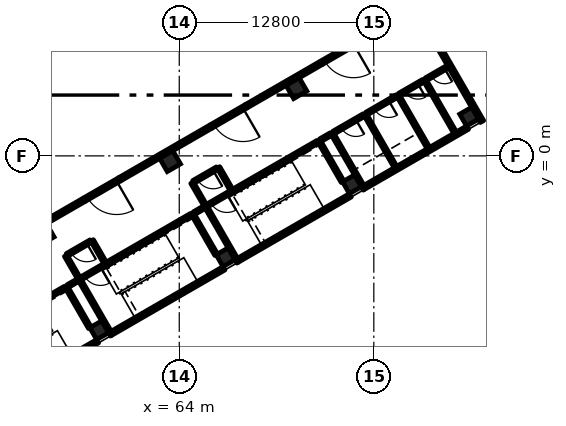
"""IFC4 building model, lengths in metres.
Left out: names, types, materials, properties, quantities, classifications, styles, units other than length and angle.
Written with IfcOpenShell. Run it as: python <this file> out.ifc"""

import sys

from ifc_helpers import new_model, si_unit, direction, frame, frame_2d, origin, origin_2d, place, context, subcontext, project, spatial, rectangle, extrude, element, fill, save


model = new_model("IFC4")
c1 = context("Model", 3, precision=1e-05, world=origin(), true_north=direction((0.0, 1.0)))
c2 = subcontext(c1, "Body", "Model", "MODEL_VIEW")
j1 = project(units=[si_unit("LENGTHUNIT", "METRE"), si_unit("PLANEANGLEUNIT", "RADIAN")], contexts=[c1])
p1 = place(None, origin())
s1 = spatial("IfcSite", under=j1, at=p1, CompositionType="ELEMENT")
p2 = place(p1, origin())
s2 = spatial("IfcBuilding", under=s1, at=p2, CompositionType="ELEMENT")
p3 = place(p2, frame((0.0, 0.0, 6.0)))
s3 = spatial("IfcBuildingStorey", under=s2, at=p3, CompositionType="ELEMENT", Elevation=6.0)
for number, where, z_axis, x_axis in (
    (1, (58.732, -11.471, 0.0), (0.0, 0.0, 1.0), (-0.5, 0.866, 0.0)),
    (2, (67.046, -6.671, 0.0), (0.0, 0.0, 1.0), (-0.5, 0.866, 0.0)),
    (3, (75.36, -1.871, 0.0), (0.0, 0.0, 1.0), (-0.5, 0.866, 0.0)),
    (4, (83.067, 2.579, 0.0), (0.0, 0.0, 1.0), (-0.5, 0.866, 0.0)),
):
    element("IfcColumn", number, at=place(p3, frame(where, z_axis=z_axis, x_axis=x_axis)), inside=s3, PredefinedType="COLUMN", context=c2, shape_type="SweptSolid", body=[
        extrude(rectangle(XDim=0.9, YDim=0.9, at=origin_2d()), origin(), (0.0, 0.0, 1.0), 5.4),
    ])
for number, where, z_axis, x_axis in (
    (5, (55.082, -5.149, 0.0), (0.0, 0.0, 1.0), (-0.5, 0.866, 0.0)),
    (6, (63.396, -0.349, 0.0), (0.0, 0.0, 1.0), (-0.5, 0.866, 0.0)),
    (7, (71.71, 4.451, 0.0), (0.0, 0.0, 1.0), (-0.5, 0.866, 0.0)),
):
    element("IfcColumn", number, at=place(p3, frame(where, z_axis=z_axis, x_axis=x_axis)), inside=s3, PredefinedType="COLUMN", context=c2, shape_type="SweptSolid", body=[
        extrude(rectangle(XDim=1.0, YDim=1.0, at=origin_2d()), origin(), (0.0, 0.0, 1.0), 5.4),
    ])
p4 = place(p3, frame((78.759, 11.191, 0.0), z_axis=(0.0, 0.0, 1.0), x_axis=(0.500001855621, -0.866024332438, 0.0)))
e8 = element("IfcWall", 8, at=p4, inside=s3, PredefinedType="SOLIDWALL", context=c2, shape_type="SweptSolid", body=[
    extrude(rectangle(XDim=10.312, YDim=0.25, at=frame_2d((5.156, 0.0))), origin(), (0.0, 0.0, 1.0), 5.1),
])
p5 = place(p3, frame((58.63, -12.194, 0.0), z_axis=(0.0, 0.0, 1.0), x_axis=(-0.866027159341, -0.499996959274, 0.0)))
e9 = element("IfcWall", 9, at=p5, inside=s3, PredefinedType="SOLIDWALL", context=c2, shape_type="SweptSolid", body=[
    extrude(rectangle(XDim=11.625, YDim=0.25, at=frame_2d((5.812, 0.0))), origin(), (0.0, 0.0, 1.0), 5.1),
])
p6 = place(p3, frame((66.944, -7.394, 0.0), z_axis=(0.0, 0.0, 1.0), x_axis=(-0.866033360935, -0.499986217557, 0.0)))
e10 = element("IfcWall", 10, at=p6, inside=s3, PredefinedType="SOLIDWALL", context=c2, shape_type="SweptSolid", body=[
    extrude(rectangle(XDim=8.6, YDim=0.25, at=frame_2d((4.3, 0.0))), origin(), (0.0, 0.0, 1.0), 5.1),
])
p7 = place(p3, frame((75.258, -2.594, 0.0), z_axis=(0.0, 0.0, 1.0), x_axis=(-0.866028165386, -0.499995216735, 0.0)))
e11 = element("IfcWall", 11, at=p7, inside=s3, PredefinedType="SOLIDWALL", context=c2, shape_type="SweptSolid", body=[
    extrude(rectangle(XDim=8.6, YDim=0.25, at=frame_2d((4.3, 0.0))), origin(), (0.0, 0.0, 1.0), 5.1),
])
p8 = place(p3, frame((82.965, 1.856, 0.0), z_axis=(0.0, 0.0, 1.0), x_axis=(-0.866026562566, -0.499997992926, 0.0)))
e12 = element("IfcWall", 12, at=p8, inside=s3, PredefinedType="SOLIDWALL", context=c2, shape_type="SweptSolid", body=[
    extrude(rectangle(XDim=7.9, YDim=0.25, at=frame_2d((3.95, 0.0))), origin(), (0.0, 0.0, 1.0), 5.1),
])
p9 = place(p3, frame((59.496, -11.694, 0.0), z_axis=(0.0, 0.0, 1.0), x_axis=(-0.865982457891, -0.500074377092, 0.0)))
e13 = element("IfcWall", 13, at=p9, inside=s3, PredefinedType="SOLIDWALL", context=c2, shape_type="SweptSolid", body=[
    extrude(rectangle(XDim=0.1, YDim=0.25, at=frame_2d((0.05, 0.0))), origin(), (0.0, 0.0, 1.0), 5.1),
])
p10 = place(p3, frame((67.81, -6.894, 0.0), z_axis=(0.0, 0.0, 1.0), x_axis=(-0.867038199201, -0.4982416694, 0.0)))
e14 = element("IfcWall", 14, at=p10, inside=s3, PredefinedType="SOLIDWALL", context=c2, shape_type="SweptSolid", body=[
    extrude(rectangle(XDim=0.1, YDim=0.25, at=frame_2d((0.05, 0.0))), origin(), (0.0, 0.0, 1.0), 5.1),
])
p11 = place(p3, frame((76.124, -2.094, 0.0), z_axis=(0.0, 0.0, 1.0), x_axis=(-0.865982457891, -0.500074377092, 0.0)))
e15 = element("IfcWall", 15, at=p11, inside=s3, PredefinedType="SOLIDWALL", context=c2, shape_type="SweptSolid", body=[
    extrude(rectangle(XDim=0.1, YDim=0.25, at=frame_2d((0.05, 0.0))), origin(), (0.0, 0.0, 1.0), 5.1),
])
p12 = place(p3, frame((58.117, -11.306, 0.0), z_axis=(0.0, 0.0, 1.0), x_axis=(-0.499933790963, 0.866063626216, 0.0)))
e16 = element("IfcWall", 16, at=p12, inside=s3, PredefinedType="SOLIDWALL", context=c2, shape_type="SweptSolid", body=[
    extrude(rectangle(XDim=3.1, YDim=0.2, at=frame_2d((1.55, 0.0))), origin(), (0.0, 0.0, 1.0), 5.1),
])
p13 = place(p3, frame((59.433, -11.585, 0.0), z_axis=(0.0, 0.0, 1.0), x_axis=(-0.49999894854, 0.866026010844, 0.0)))
e17 = element("IfcWall", 17, at=p13, inside=s3, PredefinedType="SOLIDWALL", context=c2, shape_type="SweptSolid", body=[
    extrude(rectangle(XDim=4.0, YDim=0.2, at=frame_2d((2.0, 0.0))), origin(), (0.0, 0.0, 1.0), 5.1),
])
p14 = place(p3, frame((66.431, -6.506, 0.0), z_axis=(0.0, 0.0, 1.0), x_axis=(-0.49999285859, 0.86602952684, 0.0)))
e18 = element("IfcWall", 18, at=p14, inside=s3, PredefinedType="SOLIDWALL", context=c2, shape_type="SweptSolid", body=[
    extrude(rectangle(XDim=3.1, YDim=0.2, at=frame_2d((1.55, 0.0))), origin(), (0.0, 0.0, 1.0), 5.1),
])
p15 = place(p3, frame((67.747, -6.785, 0.0), z_axis=(0.0, 0.0, 1.0), x_axis=(-0.49999894854, 0.866026010844, 0.0)))
e19 = element("IfcWall", 19, at=p15, inside=s3, PredefinedType="SOLIDWALL", context=c2, shape_type="SweptSolid", body=[
    extrude(rectangle(XDim=4.0, YDim=0.2, at=frame_2d((2.0, 0.0))), origin(), (0.0, 0.0, 1.0), 5.1),
])
p16 = place(p3, frame((74.745, -1.706, 0.0), z_axis=(0.0, 0.0, 1.0), x_axis=(-0.500026960575, 0.86600983753, 0.0)))
e20 = element("IfcWall", 20, at=p16, inside=s3, PredefinedType="SOLIDWALL", context=c2, shape_type="SweptSolid", body=[
    extrude(rectangle(XDim=3.1, YDim=0.2, at=frame_2d((1.55, 0.0))), origin(), (0.0, 0.0, 1.0), 5.1),
])
p17 = place(p3, frame((50.722, -11.996, 0.0), z_axis=(0.0, 0.0, 1.0), x_axis=(0.866027239912, 0.49999681972, 0.0)))
e21 = element("IfcWall", 21, at=p17, inside=s3, PredefinedType="SOLIDWALL", context=c2, shape_type="SweptSolid", body=[
    extrude(rectangle(XDim=6.65, YDim=0.2, at=frame_2d((3.325, 0.0))), origin(), (0.0, 0.0, 1.0), 5.1),
])
p18 = place(p3, frame((59.035, -7.196, 0.0), z_axis=(0.0, 0.0, 1.0), x_axis=(-0.866002029911, -0.500040482552, 0.0)))
e22 = element("IfcWall", 22, at=p18, inside=s3, PredefinedType="SOLIDWALL", context=c2, shape_type="SweptSolid", body=[
    extrude(rectangle(XDim=1.75, YDim=0.2, at=frame_2d((0.875, 0.0))), origin(), (0.0, 0.0, 1.0), 5.1),
])
p19 = place(p18, frame((0.25, 0.0, 0.0)))
e23 = element("IfcOpeningElement", 23, at=p19, cuts=e22, PredefinedType="OPENING", context=c2, shape_type="SweptSolid", body=[
    extrude(rectangle(XDim=1.2, YDim=2.1, at=frame_2d((0.6, 1.05))), frame((0.0, 0.11, 0.0), z_axis=(0.0, -1.0, 0.0), x_axis=(1.0, 0.0, 0.0)), (0.0, 0.0, 1.0), 0.22),
])
p20 = place(p3, frame((59.035, -7.196, 0.0), z_axis=(0.0, 0.0, 1.0), x_axis=(0.866027239912, 0.49999681972, 0.0)))
e24 = element("IfcWall", 24, at=p20, inside=s3, PredefinedType="SOLIDWALL", context=c2, shape_type="SweptSolid", body=[
    extrude(rectangle(XDim=6.65, YDim=0.2, at=frame_2d((3.325, 0.0))), origin(), (0.0, 0.0, 1.0), 5.1),
])
p21 = place(p3, frame((67.349, -2.396, 0.0), z_axis=(0.0, 0.0, 1.0), x_axis=(-0.866036909293, -0.499980071345, 0.0)))
e25 = element("IfcWall", 25, at=p21, inside=s3, PredefinedType="SOLIDWALL", context=c2, shape_type="SweptSolid", body=[
    extrude(rectangle(XDim=1.75, YDim=0.2, at=frame_2d((0.875, 0.0))), origin(), (0.0, 0.0, 1.0), 5.1),
])
p22 = place(p21, frame((0.25, 0.0, 0.0)))
e26 = element("IfcOpeningElement", 26, at=p22, cuts=e25, PredefinedType="OPENING", context=c2, shape_type="SweptSolid", body=[
    extrude(rectangle(XDim=1.2, YDim=2.1, at=frame_2d((0.6, 1.05))), frame((0.0, 0.11, 0.0), z_axis=(0.0, -1.0, 0.0), x_axis=(1.0, 0.0, 0.0)), (0.0, 0.0, 1.0), 0.22),
])
p23 = place(p3, frame((67.349, -2.396, 0.0), z_axis=(0.0, 0.0, 1.0), x_axis=(0.86601134256, 0.500024353964, 0.0)))
e27 = element("IfcWall", 27, at=p23, inside=s3, PredefinedType="SOLIDWALL", context=c2, shape_type="SweptSolid", body=[
    extrude(rectangle(XDim=6.65, YDim=0.2, at=frame_2d((3.325, 0.0))), origin(), (0.0, 0.0, 1.0), 5.1),
])
for number, where, z_axis, x_axis in (
    (28, (76.061, -1.986, 0.0), (0.0, 0.0, 1.0), (-0.5, 0.866, 0.0)),
    (29, (78.226, -0.736, 0.0), (0.0, 0.0, 1.0), (-0.5, 0.866, 0.0)),
    (30, (80.391, 0.514, 0.0), (0.0, 0.0, 1.0), (-0.5, 0.866, 0.0)),
):
    element("IfcWall", number, at=place(p3, frame(where, z_axis=z_axis, x_axis=x_axis)), inside=s3, PredefinedType="SOLIDWALL", context=c2, shape_type="SweptSolid", body=[
        extrude(rectangle(XDim=4.0, YDim=0.2, at=frame_2d((2.0, 0.0))), origin(), (0.0, 0.0, 1.0), 5.1),
    ])
p24 = place(p3, frame((76.139, 2.679, 0.0), z_axis=(0.0, 0.0, 1.0), x_axis=(-0.865980515519, -0.500077740698, 0.0)))
e31 = element("IfcWall", 31, at=p24, inside=s3, PredefinedType="SOLIDWALL", context=c2, shape_type="SweptSolid", body=[
    extrude(rectangle(XDim=2.3, YDim=0.2, at=frame_2d((1.15, 0.0))), origin(), (0.0, 0.0, 1.0), 5.1),
])
p25 = place(p24, frame((0.6, 0.0, 0.0)))
e32 = element("IfcOpeningElement", 32, at=p25, cuts=e31, PredefinedType="OPENING", context=c2, shape_type="SweptSolid", body=[
    extrude(rectangle(XDim=1.1, YDim=2.1, at=frame_2d((0.55, 1.05))), frame((0.0, 0.11, 0.0), z_axis=(0.0, -1.0, 0.0), x_axis=(1.0, 0.0, 0.0)), (0.0, 0.0, 1.0), 0.22),
])
p26 = place(p3, frame((78.304, 3.929, 0.0), z_axis=(0.0, 0.0, 1.0), x_axis=(-0.865980515519, -0.500077740698, 0.0)))
e33 = element("IfcWall", 33, at=p26, inside=s3, PredefinedType="SOLIDWALL", context=c2, shape_type="SweptSolid", body=[
    extrude(rectangle(XDim=2.3, YDim=0.2, at=frame_2d((1.15, 0.0))), origin(), (0.0, 0.0, 1.0), 5.1),
])
p27 = place(p26, frame((0.6, 0.0, 0.0)))
e34 = element("IfcOpeningElement", 34, at=p27, cuts=e33, PredefinedType="OPENING", context=c2, shape_type="SweptSolid", body=[
    extrude(rectangle(XDim=1.1, YDim=2.1, at=frame_2d((0.55, 1.05))), frame((0.0, 0.11, 0.0), z_axis=(0.0, -1.0, 0.0), x_axis=(1.0, 0.0, 0.0)), (0.0, 0.0, 1.0), 0.22),
])
for number, where, z_axis, x_axis in (
    (35, (57.383, -8.035, 0.0), (0.0, 0.0, 1.0), (-0.5, 0.866, 0.0)),
    (36, (59.115, -7.035, 0.0), (0.0, 0.0, 1.0), (-0.5, 0.866, 0.0)),
):
    element("IfcWall", number, at=place(p3, frame(where, z_axis=z_axis, x_axis=x_axis)), inside=s3, PredefinedType="PARTITIONING", context=c2, shape_type="SweptSolid", body=[
        extrude(rectangle(XDim=1.7, YDim=0.2, at=frame_2d((0.85, 0.0))), origin(), (0.0, 0.0, 1.0), 4.5),
    ])
p28 = place(p3, frame((65.697, -3.235, 0.0), z_axis=(0.0, 0.0, 1.0), x_axis=(-0.499892348375, 0.866087547558, 0.0)))
e37 = element("IfcWall", 37, at=p28, inside=s3, PredefinedType="PARTITIONING", context=c2, shape_type="SweptSolid", body=[
    extrude(rectangle(XDim=1.7, YDim=0.2, at=frame_2d((0.85, 0.0))), origin(), (0.0, 0.0, 1.0), 4.5),
])
p29 = place(p3, frame((67.429, -2.235, 0.0), z_axis=(0.0, 0.0, 1.0), x_axis=(-0.500000056704, 0.866025371046, 0.0)))
e38 = element("IfcWall", 38, at=p29, inside=s3, PredefinedType="PARTITIONING", context=c2, shape_type="SweptSolid", body=[
    extrude(rectangle(XDim=1.7, YDim=0.2, at=frame_2d((0.85, 0.0))), origin(), (0.0, 0.0, 1.0), 4.5),
])
p30 = place(p3, frame((58.179, -5.613, 0.0), z_axis=(0.0, 0.0, 1.0), x_axis=(-0.866047807691, -0.499961193289, 0.0)))
e39 = element("IfcWall", 39, at=p30, inside=s3, PredefinedType="PARTITIONING", context=c2, shape_type="SweptSolid", body=[
    extrude(rectangle(XDim=1.8, YDim=0.2, at=frame_2d((0.9, 0.0))), origin(), (0.0, 0.0, 1.0), 4.5),
])
p31 = place(p30, frame((0.3, 0.0, 0.0)))
e40 = element("IfcOpeningElement", 40, at=p31, cuts=e39, PredefinedType="OPENING", context=c2, shape_type="SweptSolid", body=[
    extrude(rectangle(XDim=1.2, YDim=2.1, at=frame_2d((0.6, 1.05))), frame((0.0, 0.11, 0.0), z_axis=(0.0, -1.0, 0.0), x_axis=(1.0, 0.0, 0.0)), (0.0, 0.0, 1.0), 0.22),
])
p32 = place(p3, frame((66.493, -0.812, 0.0), z_axis=(0.0, 0.0, 1.0), x_axis=(-0.866081705922, -0.499902469156, 0.0)))
e41 = element("IfcWall", 41, at=p32, inside=s3, PredefinedType="PARTITIONING", context=c2, shape_type="SweptSolid", body=[
    extrude(rectangle(XDim=1.8, YDim=0.2, at=frame_2d((0.9, 0.0))), origin(), (0.0, 0.0, 1.0), 4.5),
])
p33 = place(p32, frame((0.3, 0.0, 0.0)))
e42 = element("IfcOpeningElement", 42, at=p33, cuts=e41, PredefinedType="OPENING", context=c2, shape_type="SweptSolid", body=[
    extrude(rectangle(XDim=1.2, YDim=2.1, at=frame_2d((0.6, 1.05))), frame((0.0, 0.11, 0.0), z_axis=(0.0, -1.0, 0.0), x_axis=(1.0, 0.0, 0.0)), (0.0, 0.0, 1.0), 0.22),
])
p34 = place(p3, frame((51.782, -6.333, 0.0), z_axis=(0.0, 0.0, 1.0), x_axis=(0.866028853923, 0.499994024137, 0.0)))
e43 = element("IfcWall", 43, at=p34, inside=s3, PredefinedType="SOLIDWALL", context=c2, shape_type="SweptSolid", body=[
    extrude(rectangle(XDim=6.9, YDim=0.25, at=frame_2d((3.45, 0.0))), origin(), (0.0, 0.0, 1.0), 4.5),
])
p35 = place(p3, frame((60.095, -1.532, 0.0), z_axis=(0.0, 0.0, 1.0), x_axis=(-0.86599734893, -0.500048589285, 0.0)))
e44 = element("IfcWall", 44, at=p35, inside=s3, PredefinedType="SOLIDWALL", context=c2, shape_type="SweptSolid", body=[
    extrude(rectangle(XDim=2.7, YDim=0.25, at=frame_2d((1.35, 0.0))), origin(), (0.0, 0.0, 1.0), 4.5),
])
p36 = place(p35, frame((0.25, 0.0, 0.0)))
e45 = element("IfcOpeningElement", 45, at=p36, cuts=e44, PredefinedType="OPENING", context=c2, shape_type="SweptSolid", body=[
    extrude(rectangle(XDim=2.2, YDim=2.1, at=frame_2d((1.1, 1.05))), frame((0.0, 0.135, 0.0), z_axis=(0.0, -1.0, 0.0), x_axis=(1.0, 0.0, 0.0)), (0.0, 0.0, 1.0), 0.27),
])
p37 = place(p3, frame((60.095, -1.532, 0.0), z_axis=(0.0, 0.0, 1.0), x_axis=(0.866028853923, 0.499994024137, 0.0)))
e46 = element("IfcWall", 46, at=p37, inside=s3, PredefinedType="SOLIDWALL", context=c2, shape_type="SweptSolid", body=[
    extrude(rectangle(XDim=6.9, YDim=0.25, at=frame_2d((3.45, 0.0))), origin(), (0.0, 0.0, 1.0), 4.5),
])
p38 = place(p3, frame((68.409, 3.268, 0.0), z_axis=(0.0, 0.0, 1.0), x_axis=(-0.866019956843, -0.50000943426, 0.0)))
e47 = element("IfcWall", 47, at=p38, inside=s3, PredefinedType="SOLIDWALL", context=c2, shape_type="SweptSolid", body=[
    extrude(rectangle(XDim=2.7, YDim=0.25, at=frame_2d((1.35, 0.0))), origin(), (0.0, 0.0, 1.0), 4.5),
])
p39 = place(p38, frame((0.25, 0.0, 0.0)))
e48 = element("IfcOpeningElement", 48, at=p39, cuts=e47, PredefinedType="OPENING", context=c2, shape_type="SweptSolid", body=[
    extrude(rectangle(XDim=2.2, YDim=2.1, at=frame_2d((1.1, 1.05))), frame((0.0, 0.135, 0.0), z_axis=(0.0, -1.0, 0.0), x_axis=(1.0, 0.0, 0.0)), (0.0, 0.0, 1.0), 0.27),
])
p40 = place(p3, frame((68.409, 3.268, 0.0), z_axis=(0.0, 0.0, 1.0), x_axis=(0.866033658841, 0.49998570155, 0.0)))
e49 = element("IfcWall", 49, at=p40, inside=s3, PredefinedType="SOLIDWALL", context=c2, shape_type="SweptSolid", body=[
    extrude(rectangle(XDim=5.7, YDim=0.25, at=frame_2d((2.85, 0.0))), origin(), (0.0, 0.0, 1.0), 4.5),
])
p41 = place(p3, frame((75.684, 7.468, 0.0), z_axis=(0.0, 0.0, 1.0), x_axis=(-0.866019956843, -0.50000943426, 0.0)))
e50 = element("IfcWall", 50, at=p41, inside=s3, PredefinedType="SOLIDWALL", context=c2, shape_type="SweptSolid", body=[
    extrude(rectangle(XDim=2.7, YDim=0.25, at=frame_2d((1.35, 0.0))), origin(), (0.0, 0.0, 1.0), 4.5),
])
p42 = place(p41, frame((0.25, 0.0, 0.0)))
e51 = element("IfcOpeningElement", 51, at=p42, cuts=e50, PredefinedType="OPENING", context=c2, shape_type="SweptSolid", body=[
    extrude(rectangle(XDim=2.2, YDim=2.1, at=frame_2d((1.1, 1.05))), frame((0.0, 0.135, 0.0), z_axis=(0.0, -1.0, 0.0), x_axis=(1.0, 0.0, 0.0)), (0.0, 0.0, 1.0), 0.27),
])
p43 = place(p3, frame((82.145, 1.527, 0.0), z_axis=(0.0, 0.0, 1.0), x_axis=(-0.49999894854, 0.866026010844, 0.0)))
e52 = element("IfcWall", 52, at=p43, inside=s3, PredefinedType="PARTITIONING", context=c2, shape_type="SweptSolid", body=[
    extrude(rectangle(XDim=4.0, YDim=0.2, at=frame_2d((2.0, 0.0))), origin(), (0.0, 0.0, 1.0), 4.5),
])
p44 = place(p3, frame((80.058, 4.941, 0.0), z_axis=(0.0, 0.0, 1.0), x_axis=(-0.865978377894, -0.500081442387, 0.0)))
e53 = element("IfcWall", 53, at=p44, inside=s3, PredefinedType="PARTITIONING", context=c2, shape_type="SweptSolid", body=[
    extrude(rectangle(XDim=1.825, YDim=0.2, at=frame_2d((0.913, 0.0))), origin(), (0.0, 0.0, 1.0), 4.5),
])
p45 = place(p44, frame((0.413, 0.0, 0.0)))
e54 = element("IfcOpeningElement", 54, at=p45, cuts=e53, PredefinedType="OPENING", context=c2, shape_type="SweptSolid", body=[
    extrude(rectangle(XDim=1.0, YDim=2.1, at=frame_2d((0.5, 1.05))), frame((0.0, 0.11, 0.0), z_axis=(0.0, -1.0, 0.0), x_axis=(1.0, 0.0, 0.0)), (0.0, 0.0, 1.0), 0.22),
])
p46 = place(p3, frame((81.682, 5.879, 0.0), z_axis=(0.0, 0.0, 1.0), x_axis=(-0.865964676353, -0.500105168249, 0.0)))
e55 = element("IfcWall", 55, at=p46, inside=s3, PredefinedType="PARTITIONING", context=c2, shape_type="SweptSolid", body=[
    extrude(rectangle(XDim=1.675, YDim=0.2, at=frame_2d((0.837, 0.0))), origin(), (0.0, 0.0, 1.0), 4.5),
])
p47 = place(p46, frame((0.262, 0.0, 0.0)))
e56 = element("IfcOpeningElement", 56, at=p47, cuts=e55, PredefinedType="OPENING", context=c2, shape_type="SweptSolid", body=[
    extrude(rectangle(XDim=1.0, YDim=2.1, at=frame_2d((0.5, 1.05))), frame((0.0, 0.11, 0.0), z_axis=(0.0, -1.0, 0.0), x_axis=(1.0, 0.0, 0.0)), (0.0, 0.0, 1.0), 0.22),
])
p48 = place(p3, frame((56.654, -8.571, 0.0), z_axis=(0.0, 0.0, 1.0), x_axis=(0.866094119867, 0.499880961361, 0.0)))
e57 = element("IfcWall", 57, at=p48, inside=s3, PredefinedType="PARTITIONING", context=c2, shape_type="SweptSolid", body=[
    extrude(rectangle(XDim=0.8, YDim=0.2, at=frame_2d((0.4, 0.0))), origin(), (0.0, 0.0, 1.0), 4.5),
])
p49 = place(p3, frame((64.968, -3.771, 0.0), z_axis=(0.0, 0.0, 1.0), x_axis=(0.865885638426, 0.500242002602, 0.0)))
e58 = element("IfcWall", 58, at=p49, inside=s3, PredefinedType="PARTITIONING", context=c2, shape_type="SweptSolid", body=[
    extrude(rectangle(XDim=0.8, YDim=0.2, at=frame_2d((0.4, 0.0))), origin(), (0.0, 0.0, 1.0), 4.5),
])
p50 = place(p3, frame((73.281, 1.029, 0.0), z_axis=(0.0, 0.0, 1.0), x_axis=(0.865961984968, 0.500109828528, 0.0)))
e59 = element("IfcWall", 59, at=p50, inside=s3, PredefinedType="PARTITIONING", context=c2, shape_type="SweptSolid", body=[
    extrude(rectangle(XDim=0.8, YDim=0.2, at=frame_2d((0.4, 0.0))), origin(), (0.0, 0.0, 1.0), 4.5),
])
p51 = place(p19, origin())
e60 = element("IfcDoor", 60, at=p51, inside=s3, OperationType="SINGLE_SWING_LEFT", PredefinedType="DOOR", context=c2, shape_type="SweptSolid", body=[
    extrude(rectangle(XDim=1.2, YDim=2.1, at=frame_2d((0.6, 1.05))), frame((0.0, 0.025, 0.0), z_axis=(0.0, -1.0, 0.0), x_axis=(1.0, 0.0, 0.0)), (0.0, 0.0, 1.0), 0.05),
])
fill(e23, e60)
p52 = place(p22, origin())
e61 = element("IfcDoor", 61, at=p52, inside=s3, OperationType="SINGLE_SWING_LEFT", PredefinedType="DOOR", context=c2, shape_type="SweptSolid", body=[
    extrude(rectangle(XDim=1.2, YDim=2.1, at=frame_2d((0.6, 1.05))), frame((0.0, 0.025, 0.0), z_axis=(0.0, -1.0, 0.0), x_axis=(1.0, 0.0, 0.0)), (0.0, 0.0, 1.0), 0.05),
])
fill(e26, e61)
p53 = place(p25, origin())
e62 = element("IfcDoor", 62, at=p53, inside=s3, OperationType="DOUBLE_DOOR_SLIDING", PredefinedType="DOOR", context=c2, shape_type="SweptSolid", body=[
    extrude(rectangle(XDim=1.1, YDim=2.1, at=frame_2d((0.55, 1.05))), frame((0.0, 0.025, 0.0), z_axis=(0.0, -1.0, 0.0), x_axis=(1.0, 0.0, 0.0)), (0.0, 0.0, 1.0), 0.05),
])
fill(e32, e62)
p54 = place(p27, origin())
e63 = element("IfcDoor", 63, at=p54, inside=s3, OperationType="DOUBLE_DOOR_SLIDING", PredefinedType="DOOR", context=c2, shape_type="SweptSolid", body=[
    extrude(rectangle(XDim=1.1, YDim=2.1, at=frame_2d((0.55, 1.05))), frame((0.0, 0.025, 0.0), z_axis=(0.0, -1.0, 0.0), x_axis=(1.0, 0.0, 0.0)), (0.0, 0.0, 1.0), 0.05),
])
fill(e34, e63)
p55 = place(p31, origin())
e64 = element("IfcDoor", 64, at=p55, inside=s3, OperationType="SINGLE_SWING_LEFT", PredefinedType="DOOR", context=c2, shape_type="SweptSolid", body=[
    extrude(rectangle(XDim=1.2, YDim=2.1, at=frame_2d((0.6, 1.05))), frame((0.0, 0.025, 0.0), z_axis=(0.0, -1.0, 0.0), x_axis=(1.0, 0.0, 0.0)), (0.0, 0.0, 1.0), 0.05),
])
fill(e40, e64)
p56 = place(p33, origin())
e65 = element("IfcDoor", 65, at=p56, inside=s3, OperationType="SINGLE_SWING_LEFT", PredefinedType="DOOR", context=c2, shape_type="SweptSolid", body=[
    extrude(rectangle(XDim=1.2, YDim=2.1, at=frame_2d((0.6, 1.05))), frame((0.0, 0.025, 0.0), z_axis=(0.0, -1.0, 0.0), x_axis=(1.0, 0.0, 0.0)), (0.0, 0.0, 1.0), 0.05),
])
fill(e42, e65)
p57 = place(p36, origin())
e66 = element("IfcDoor", 66, at=p57, inside=s3, OperationType="DOUBLE_DOOR_SINGLE_SWING", PredefinedType="DOOR", context=c2, shape_type="SweptSolid", body=[
    extrude(rectangle(XDim=2.2, YDim=2.1, at=frame_2d((1.1, 1.05))), frame((0.0, 0.025, 0.0), z_axis=(0.0, -1.0, 0.0), x_axis=(1.0, 0.0, 0.0)), (0.0, 0.0, 1.0), 0.05),
])
fill(e45, e66)
p58 = place(p39, origin())
e67 = element("IfcDoor", 67, at=p58, inside=s3, OperationType="DOUBLE_DOOR_SINGLE_SWING", PredefinedType="DOOR", context=c2, shape_type="SweptSolid", body=[
    extrude(rectangle(XDim=2.2, YDim=2.1, at=frame_2d((1.1, 1.05))), frame((0.0, 0.025, 0.0), z_axis=(0.0, -1.0, 0.0), x_axis=(1.0, 0.0, 0.0)), (0.0, 0.0, 1.0), 0.05),
])
fill(e48, e67)
p59 = place(p42, origin())
e68 = element("IfcDoor", 68, at=p59, inside=s3, OperationType="DOUBLE_DOOR_SINGLE_SWING", PredefinedType="DOOR", context=c2, shape_type="SweptSolid", body=[
    extrude(rectangle(XDim=2.2, YDim=2.1, at=frame_2d((1.1, 1.05))), frame((0.0, 0.025, 0.0), z_axis=(0.0, -1.0, 0.0), x_axis=(1.0, 0.0, 0.0)), (0.0, 0.0, 1.0), 0.05),
])
fill(e51, e68)
p60 = place(p45, origin())
e69 = element("IfcDoor", 69, at=p60, inside=s3, OperationType="SINGLE_SWING_LEFT", PredefinedType="DOOR", context=c2, shape_type="SweptSolid", body=[
    extrude(rectangle(XDim=1.0, YDim=2.1, at=frame_2d((0.5, 1.05))), frame((0.0, 0.025, 0.0), z_axis=(0.0, -1.0, 0.0), x_axis=(1.0, 0.0, 0.0)), (0.0, 0.0, 1.0), 0.05),
])
fill(e54, e69)
p61 = place(p47, origin())
e70 = element("IfcDoor", 70, at=p61, inside=s3, OperationType="SINGLE_SWING_LEFT", PredefinedType="DOOR", context=c2, shape_type="SweptSolid", body=[
    extrude(rectangle(XDim=1.0, YDim=2.1, at=frame_2d((0.5, 1.05))), frame((0.0, 0.025, 0.0), z_axis=(0.0, -1.0, 0.0), x_axis=(1.0, 0.0, 0.0)), (0.0, 0.0, 1.0), 0.05),
])
fill(e56, e70)
save(model, sys.argv[1])
